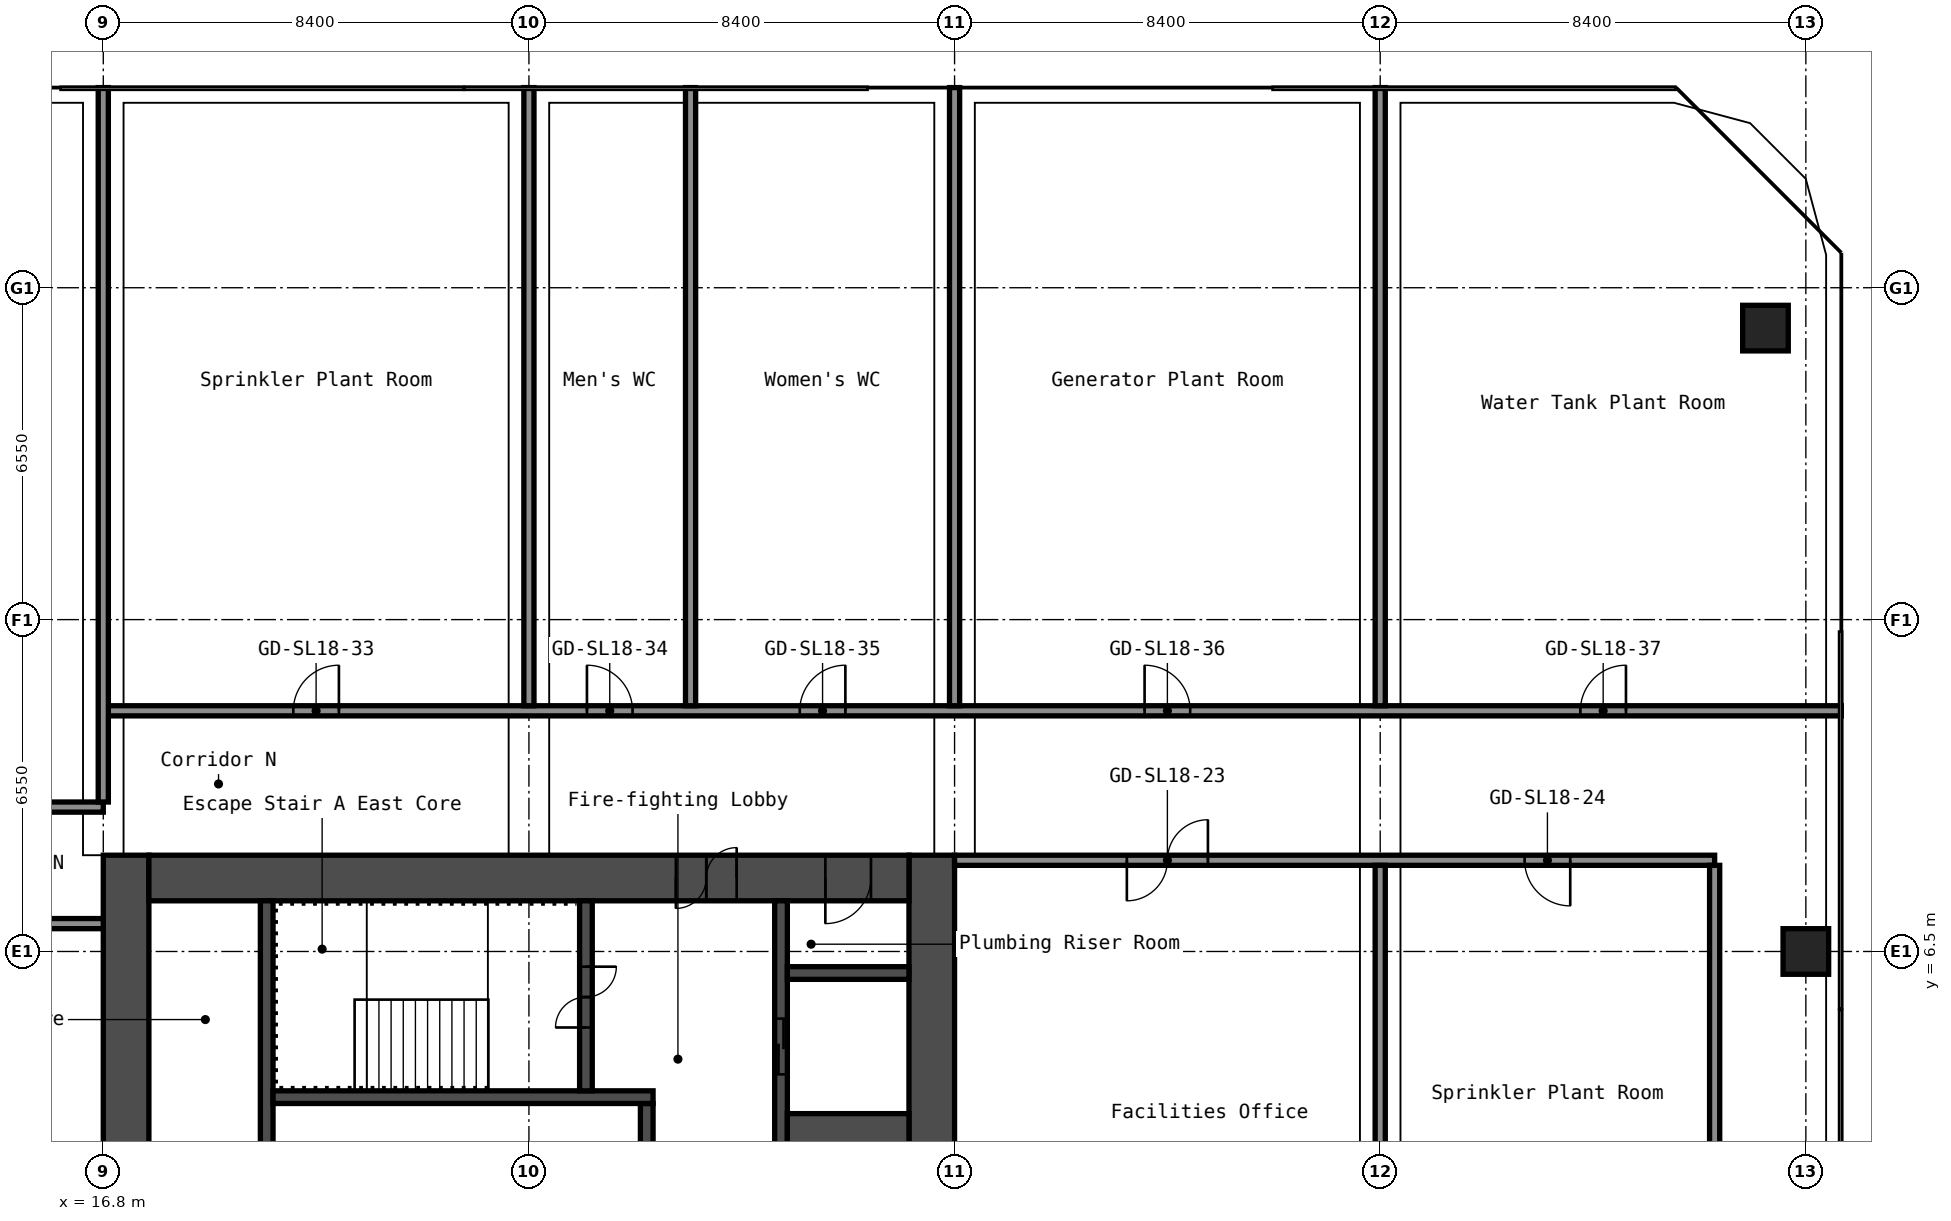
"""IFC4 building model, lengths in metres.
Left out: names, types, materials, properties, quantities, classifications, styles, units other than length and angle.
Written with IfcOpenShell. Run it as: python <this file> out.ifc"""

import sys

from ifc_helpers import new_model, si_unit, direction, frame, frame_2d, origin, origin_2d, place, context, subcontext, project, spatial, rectangle, hollow_rectangle, extrude, element, fill, save


model = new_model("IFC4")
c1 = context("Model", 3, precision=1e-05, world=origin(), true_north=direction((0.0, 1.0)))
c2 = subcontext(c1, "Body", "Model", "MODEL_VIEW")
j1 = project(units=[si_unit("LENGTHUNIT", "METRE"), si_unit("PLANEANGLEUNIT", "RADIAN")], contexts=[c1])
p1 = place(None, origin())
s1 = spatial("IfcSite", under=j1, at=p1, CompositionType="ELEMENT")
p2 = place(p1, origin())
s2 = spatial("IfcBuilding", under=s1, at=p2, CompositionType="ELEMENT")
p3 = place(p2, frame((0.0, 0.0, 64.6)))
s3 = spatial("IfcBuildingStorey", under=s2, at=p3, CompositionType="ELEMENT", Elevation=64.6)
for number, where, z_axis, x_axis in (
    (1, (50.4, 6.5, 0.0), (0.0, 0.0, 1.0), (1.0, 0.0, 0.0)),
    (2, (49.603, 18.803, 0.0), (0.0, 0.0, 1.0), (1.0, 0.0, 0.0)),
):
    element("IfcColumn", number, at=place(p3, frame(where, z_axis=z_axis, x_axis=x_axis)), inside=s3, PredefinedType="COLUMN", context=c2, shape_type="SweptSolid", body=[
        extrude(hollow_rectangle(XDim=0.9, YDim=0.9, WallThickness=0.036, at=origin_2d()), origin(), (0.0, 0.0, 1.0), 4.1),
    ])
p4 = place(p3, frame((17.25, -8.4, 0.0), z_axis=(0.0, 0.0, 1.0), x_axis=(0.0, 1.0, 0.0)))
e3 = element("IfcWall", 3, at=p4, inside=s3, PredefinedType="SHEAR", context=c2, shape_type="SweptSolid", body=[
    extrude(rectangle(XDim=16.8, YDim=0.9, at=frame_2d((8.4, 0.0))), origin(), (0.0, 0.0, 1.0), 4.1),
])
p5 = place(p4, frame((7.6, 0.0, 0.0)))
e4 = element("IfcOpeningElement", 4, at=p5, cuts=e3, PredefinedType="OPENING", context=c2, shape_type="SweptSolid", body=[
    extrude(rectangle(XDim=1.2, YDim=2.1, at=frame_2d((0.6, 1.05))), frame((0.0, 0.46, 0.0), z_axis=(0.0, -1.0, 0.0), x_axis=(1.0, 0.0, 0.0)), (0.0, 0.0, 1.0), 0.92),
])
p6 = place(p3, frame((33.15, -8.4, 0.0), z_axis=(0.0, 0.0, 1.0), x_axis=(0.0, 1.0, 0.0)))
e5 = element("IfcWall", 5, at=p6, inside=s3, PredefinedType="SHEAR", context=c2, shape_type="SweptSolid", body=[
    extrude(rectangle(XDim=16.8, YDim=0.9, at=frame_2d((8.4, 0.0))), origin(), (0.0, 0.0, 1.0), 4.1),
])
p7 = place(p3, frame((17.7, 7.95, 0.0), z_axis=(0.0, 0.0, 1.0), x_axis=(1.0, 0.0, 0.0)))
e6 = element("IfcWall", 6, at=p7, inside=s3, PredefinedType="SHEAR", context=c2, shape_type="SweptSolid", body=[
    extrude(rectangle(XDim=15.0, YDim=0.9, at=frame_2d((7.5, 0.0))), origin(), (0.0, 0.0, 1.0), 4.1),
])
p8 = place(p7, frame((10.4, 0.0, 0.0)))
e7 = element("IfcOpeningElement", 7, at=p8, cuts=e6, PredefinedType="OPENING", context=c2, shape_type="SweptSolid", body=[
    extrude(rectangle(XDim=1.2, YDim=2.1, at=frame_2d((0.6, 1.05))), frame((0.0, 0.46, 0.0), z_axis=(0.0, -1.0, 0.0), x_axis=(1.0, 0.0, 0.0)), (0.0, 0.0, 1.0), 0.92),
])
p9 = place(p7, frame((13.35, 0.0, 0.0)))
e8 = element("IfcOpeningElement", 8, at=p9, cuts=e6, PredefinedType="OPENING", context=c2, shape_type="SweptSolid", body=[
    extrude(rectangle(XDim=0.9, YDim=2.1, at=frame_2d((0.45, 1.05))), frame((0.0, 0.46, 0.0), z_axis=(0.0, -1.0, 0.0), x_axis=(1.0, 0.0, 0.0)), (0.0, 0.0, 1.0), 0.92),
])
p10 = place(p3, frame((20.025, 1.2, 0.0), z_axis=(0.0, 0.0, 1.0), x_axis=(0.0, 1.0, 0.0)))
e9 = element("IfcWall", 9, at=p10, inside=s3, PredefinedType="SHEAR", context=c2, shape_type="SweptSolid", body=[
    extrude(rectangle(XDim=6.3, YDim=0.25, at=frame_2d((3.15, 0.0))), origin(), (0.0, 0.0, 1.0), 4.1),
])
p11 = place(p3, frame((27.525, 1.45, 0.0), z_axis=(0.0, 0.0, 1.0), x_axis=(0.0, 1.0, 0.0)))
e10 = element("IfcWall", 10, at=p11, inside=s3, PredefinedType="SHEAR", context=c2, shape_type="SweptSolid", body=[
    extrude(rectangle(XDim=2.05, YDim=0.25, at=frame_2d((1.025, 0.0))), origin(), (0.0, 0.0, 1.0), 4.1),
])
p12 = place(p3, frame((20.15, 3.625, 0.0), z_axis=(0.0, 0.0, 1.0), x_axis=(1.0, 0.0, 0.0)))
e11 = element("IfcWall", 11, at=p12, inside=s3, PredefinedType="SHEAR", context=c2, shape_type="SweptSolid", body=[
    extrude(rectangle(XDim=7.5, YDim=0.25, at=frame_2d((3.75, 0.0))), origin(), (0.0, 0.0, 1.0), 4.1),
])
p13 = place(p3, frame((26.325, 3.75, 0.0), z_axis=(0.0, 0.0, 1.0), x_axis=(0.0, 1.0, 0.0)))
e12 = element("IfcWall", 12, at=p13, inside=s3, PredefinedType="SHEAR", context=c2, shape_type="SweptSolid", body=[
    extrude(rectangle(XDim=3.75, YDim=0.25, at=frame_2d((1.875, 0.0))), origin(), (0.0, 0.0, 1.0), 4.1),
])
p14 = place(p13, frame((1.25, 0.0, 0.0)))
e13 = element("IfcOpeningElement", 13, at=p14, cuts=e12, PredefinedType="OPENING", context=c2, shape_type="SweptSolid", body=[
    extrude(rectangle(XDim=1.2, YDim=2.1, at=frame_2d((0.6, 1.05))), frame((0.0, 0.135, 0.0), z_axis=(0.0, -1.0, 0.0), x_axis=(1.0, 0.0, 0.0)), (0.0, 0.0, 1.0), 0.27),
])
p15 = place(p3, frame((30.175, 1.45, 0.0), z_axis=(0.0, 0.0, 1.0), x_axis=(0.0, 1.0, 0.0)))
e14 = element("IfcWall", 14, at=p15, inside=s3, PredefinedType="SHEAR", context=c2, shape_type="SweptSolid", body=[
    extrude(rectangle(XDim=6.05, YDim=0.25, at=frame_2d((3.025, 0.0))), origin(), (0.0, 0.0, 1.0), 4.1),
])
p16 = place(p15, frame((2.625, 0.0, 0.0)))
e15 = element("IfcOpeningElement", 15, at=p16, cuts=e14, PredefinedType="OPENING", context=c2, shape_type="SweptSolid", body=[
    extrude(rectangle(XDim=1.1, YDim=2.1, at=frame_2d((0.55, 1.05))), frame((0.0, 0.135, 0.0), z_axis=(0.0, -1.0, 0.0), x_axis=(1.0, 0.0, 0.0)), (0.0, 0.0, 1.0), 0.27),
])
p17 = place(p3, frame((30.3, 2.375, 0.0), z_axis=(0.0, 0.0, 1.0), x_axis=(1.0, 0.0, 0.0)))
e16 = element("IfcWall", 16, at=p17, inside=s3, PredefinedType="SHEAR", context=c2, shape_type="SweptSolid", body=[
    extrude(rectangle(XDim=2.4, YDim=1.85, at=frame_2d((1.2, 0.0))), origin(), (0.0, 0.0, 1.0), 4.1),
])
p18 = place(p3, frame((30.3, 6.075, 0.0), z_axis=(0.0, 0.0, 1.0), x_axis=(1.0, 0.0, 0.0)))
e17 = element("IfcWall", 17, at=p18, inside=s3, PredefinedType="SHEAR", context=c2, shape_type="SweptSolid", body=[
    extrude(rectangle(XDim=2.4, YDim=0.25, at=frame_2d((1.2, 0.0))), origin(), (0.0, 0.0, 1.0), 4.1),
])
p19 = place(p3, frame((-16.8, 7.05, 0.0), z_axis=(0.0, 0.0, 1.0), x_axis=(1.0, 0.0, 0.0)))
e18 = element("IfcWall", 18, at=p19, inside=s3, PredefinedType="PARTITIONING", context=c2, shape_type="SweptSolid", body=[
    extrude(rectangle(XDim=33.6, YDim=0.2, at=frame_2d((16.8, 0.0))), origin(), (0.0, 0.0, 1.0), 4.1),
])
p20 = place(p19, frame((3.4, 0.0, 0.0)))
e19 = element("IfcOpeningElement", 19, at=p20, cuts=e18, PredefinedType="OPENING", context=c2, shape_type="SweptSolid", body=[
    extrude(rectangle(XDim=1.6, YDim=2.1, at=frame_2d((0.8, 1.05))), frame((0.0, 0.11, 0.0), z_axis=(0.0, -1.0, 0.0), x_axis=(1.0, 0.0, 0.0)), (0.0, 0.0, 1.0), 0.22),
])
p21 = place(p19, frame((20.55, 0.0, 0.0)))
e20 = element("IfcOpeningElement", 20, at=p21, cuts=e18, PredefinedType="OPENING", context=c2, shape_type="SweptSolid", body=[
    extrude(rectangle(XDim=0.9, YDim=2.1, at=frame_2d((0.45, 1.05))), frame((0.0, 0.11, 0.0), z_axis=(0.0, -1.0, 0.0), x_axis=(1.0, 0.0, 0.0)), (0.0, 0.0, 1.0), 0.22),
])
p22 = place(p3, frame((33.6, 8.3, 0.0), z_axis=(0.0, 0.0, 1.0), x_axis=(1.0, 0.0, 0.0)))
e21 = element("IfcWall", 21, at=p22, inside=s3, PredefinedType="PARTITIONING", context=c2, shape_type="SweptSolid", body=[
    extrude(rectangle(XDim=15.0, YDim=0.2, at=frame_2d((7.5, 0.0))), origin(), (0.0, 0.0, 1.0), 4.1),
])
p23 = place(p22, frame((3.4, 0.0, 0.0)))
e22 = element("IfcOpeningElement", 22, at=p23, cuts=e21, PredefinedType="OPENING", context=c2, shape_type="SweptSolid", body=[
    extrude(rectangle(XDim=1.6, YDim=2.1, at=frame_2d((0.8, 1.05))), frame((0.0, 0.11, 0.0), z_axis=(0.0, -1.0, 0.0), x_axis=(1.0, 0.0, 0.0)), (0.0, 0.0, 1.0), 0.22),
])
p24 = place(p22, frame((11.25, 0.0, 0.0)))
e23 = element("IfcOpeningElement", 23, at=p24, cuts=e21, PredefinedType="OPENING", context=c2, shape_type="SweptSolid", body=[
    extrude(rectangle(XDim=0.9, YDim=2.1, at=frame_2d((0.45, 1.05))), frame((0.0, 0.11, 0.0), z_axis=(0.0, -1.0, 0.0), x_axis=(1.0, 0.0, 0.0)), (0.0, 0.0, 1.0), 0.22),
])
p25 = place(p3, frame((-16.8, 9.35, 0.0), z_axis=(0.0, 0.0, 1.0), x_axis=(1.0, 0.0, 0.0)))
e24 = element("IfcWall", 24, at=p25, inside=s3, PredefinedType="PARTITIONING", context=c2, shape_type="SweptSolid", body=[
    extrude(rectangle(XDim=33.6, YDim=0.2, at=frame_2d((16.8, 0.0))), origin(), (0.0, 0.0, 1.0), 4.1),
])
p26 = place(p25, frame((3.75, 0.0, 0.0)))
e25 = element("IfcOpeningElement", 25, at=p26, cuts=e24, PredefinedType="OPENING", context=c2, shape_type="SweptSolid", body=[
    extrude(rectangle(XDim=0.9, YDim=2.1, at=frame_2d((0.45, 1.05))), frame((0.0, 0.11, 0.0), z_axis=(0.0, -1.0, 0.0), x_axis=(1.0, 0.0, 0.0)), (0.0, 0.0, 1.0), 0.22),
])
p27 = place(p25, frame((11.8, 0.0, 0.0)))
e26 = element("IfcOpeningElement", 26, at=p27, cuts=e24, PredefinedType="OPENING", context=c2, shape_type="SweptSolid", body=[
    extrude(rectangle(XDim=1.6, YDim=2.1, at=frame_2d((0.8, 1.05))), frame((0.0, 0.11, 0.0), z_axis=(0.0, -1.0, 0.0), x_axis=(1.0, 0.0, 0.0)), (0.0, 0.0, 1.0), 0.22),
])
p28 = place(p25, frame((20.55, 0.0, 0.0)))
e27 = element("IfcOpeningElement", 27, at=p28, cuts=e24, PredefinedType="OPENING", context=c2, shape_type="SweptSolid", body=[
    extrude(rectangle(XDim=0.9, YDim=2.1, at=frame_2d((0.45, 1.05))), frame((0.0, 0.11, 0.0), z_axis=(0.0, -1.0, 0.0), x_axis=(1.0, 0.0, 0.0)), (0.0, 0.0, 1.0), 0.22),
])
p29 = place(p25, frame((28.6, 0.0, 0.0)))
e28 = element("IfcOpeningElement", 28, at=p29, cuts=e24, PredefinedType="OPENING", context=c2, shape_type="SweptSolid", body=[
    extrude(rectangle(XDim=1.6, YDim=2.1, at=frame_2d((0.8, 1.05))), frame((0.0, 0.11, 0.0), z_axis=(0.0, -1.0, 0.0), x_axis=(1.0, 0.0, 0.0)), (0.0, 0.0, 1.0), 0.22),
])
p30 = place(p3, frame((16.8, 11.25, 0.0), z_axis=(0.0, 0.0, 1.0), x_axis=(1.0, 0.0, 0.0)))
e29 = element("IfcWall", 29, at=p30, inside=s3, PredefinedType="PARTITIONING", context=c2, shape_type="SweptSolid", body=[
    extrude(rectangle(XDim=34.3, YDim=0.2, at=frame_2d((17.15, 0.0))), origin(), (0.0, 0.0, 1.0), 4.1),
])
p31 = place(p30, frame((3.75, 0.0, 0.0)))
e30 = element("IfcOpeningElement", 30, at=p31, cuts=e29, PredefinedType="OPENING", context=c2, shape_type="SweptSolid", body=[
    extrude(rectangle(XDim=0.9, YDim=2.1, at=frame_2d((0.45, 1.05))), frame((0.0, 0.11, 0.0), z_axis=(0.0, -1.0, 0.0), x_axis=(1.0, 0.0, 0.0)), (0.0, 0.0, 1.0), 0.22),
])
p32 = place(p30, frame((9.545, 0.0, 0.0)))
e31 = element("IfcOpeningElement", 31, at=p32, cuts=e29, PredefinedType="OPENING", context=c2, shape_type="SweptSolid", body=[
    extrude(rectangle(XDim=0.9, YDim=2.1, at=frame_2d((0.45, 1.05))), frame((0.0, 0.11, 0.0), z_axis=(0.0, -1.0, 0.0), x_axis=(1.0, 0.0, 0.0)), (0.0, 0.0, 1.0), 0.22),
])
p33 = place(p30, frame((13.745, 0.0, 0.0)))
e32 = element("IfcOpeningElement", 32, at=p33, cuts=e29, PredefinedType="OPENING", context=c2, shape_type="SweptSolid", body=[
    extrude(rectangle(XDim=0.9, YDim=2.1, at=frame_2d((0.45, 1.05))), frame((0.0, 0.11, 0.0), z_axis=(0.0, -1.0, 0.0), x_axis=(1.0, 0.0, 0.0)), (0.0, 0.0, 1.0), 0.22),
])
p34 = place(p30, frame((20.55, 0.0, 0.0)))
e33 = element("IfcOpeningElement", 33, at=p34, cuts=e29, PredefinedType="OPENING", context=c2, shape_type="SweptSolid", body=[
    extrude(rectangle(XDim=0.9, YDim=2.1, at=frame_2d((0.45, 1.05))), frame((0.0, 0.11, 0.0), z_axis=(0.0, -1.0, 0.0), x_axis=(1.0, 0.0, 0.0)), (0.0, 0.0, 1.0), 0.22),
])
p35 = place(p30, frame((29.15, 0.0, 0.0)))
e34 = element("IfcOpeningElement", 34, at=p35, cuts=e29, PredefinedType="OPENING", context=c2, shape_type="SweptSolid", body=[
    extrude(rectangle(XDim=0.9, YDim=2.1, at=frame_2d((0.45, 1.05))), frame((0.0, 0.11, 0.0), z_axis=(0.0, -1.0, 0.0), x_axis=(1.0, 0.0, 0.0)), (0.0, 0.0, 1.0), 0.22),
])
p36 = place(p3, frame((16.8, 9.45, 0.0), z_axis=(0.0, 0.0, 1.0), x_axis=(0.0, 1.0, 0.0)))
e35 = element("IfcWall", 35, at=p36, inside=s3, PredefinedType="PARTITIONING", context=c2, shape_type="SweptSolid", body=[
    extrude(rectangle(XDim=14.1, YDim=0.2, at=frame_2d((7.05, 0.0))), origin(), (0.0, 0.0, 1.0), 4.1),
])
for number, where, z_axis, x_axis in (
    (36, (25.2, 11.35, 0.0), (0.0, 0.0, 1.0), (0.0, 1.0, 0.0)),
    (37, (28.39, 11.35, 0.0), (0.0, 0.0, 1.0), (0.0, 1.0, 0.0)),
    (38, (33.6, 11.35, 0.0), (0.0, 0.0, 1.0), (0.0, 1.0, 0.0)),
):
    element("IfcWall", number, at=place(p3, frame(where, z_axis=z_axis, x_axis=x_axis)), inside=s3, PredefinedType="PARTITIONING", context=c2, shape_type="SweptSolid", body=[
        extrude(rectangle(XDim=12.2, YDim=0.2, at=frame_2d((6.1, 0.0))), origin(), (0.0, 0.0, 1.0), 4.1),
    ])
p37 = place(p3, frame((42.0, -8.2, 0.0), z_axis=(0.0, 0.0, 1.0), x_axis=(0.0, 1.0, 0.0)))
e39 = element("IfcWall", 39, at=p37, inside=s3, PredefinedType="PARTITIONING", context=c2, shape_type="SweptSolid", body=[
    extrude(rectangle(XDim=16.4, YDim=0.2, at=frame_2d((8.2, 0.0))), origin(), (0.0, 0.0, 1.0), 4.1),
])
p38 = place(p3, frame((42.0, 11.35, 0.0), z_axis=(0.0, 0.0, 1.0), x_axis=(0.0, 1.0, 0.0)))
e40 = element("IfcWall", 40, at=p38, inside=s3, PredefinedType="PARTITIONING", context=c2, shape_type="SweptSolid", body=[
    extrude(rectangle(XDim=12.2, YDim=0.2, at=frame_2d((6.1, 0.0))), origin(), (0.0, 0.0, 1.0), 4.1),
])
p39 = place(p3, frame((48.6, -8.2, 0.0), z_axis=(0.0, 0.0, 1.0), x_axis=(0.0, 1.0, 0.0)))
e41 = element("IfcWall", 41, at=p39, inside=s3, PredefinedType="PARTITIONING", context=c2, shape_type="SweptSolid", body=[
    extrude(rectangle(XDim=16.4, YDim=0.2, at=frame_2d((8.2, 0.0))), origin(), (0.0, 0.0, 1.0), 4.1),
])
p40 = place(p8, origin())
e42 = element("IfcDoor", 42, at=p40, inside=s3, OperationType="DOUBLE_DOOR_SINGLE_SWING", PredefinedType="DOOR", context=c2, shape_type="SweptSolid", body=[
    extrude(rectangle(XDim=1.2, YDim=2.1, at=frame_2d((0.6, 1.05))), frame((0.0, 0.025, 0.0), z_axis=(0.0, -1.0, 0.0), x_axis=(1.0, 0.0, 0.0)), (0.0, 0.0, 1.0), 0.05),
])
fill(e7, e42)
p41 = place(p9, origin())
e43 = element("IfcDoor", 43, at=p41, inside=s3, OperationType="SINGLE_SWING_LEFT", PredefinedType="DOOR", context=c2, shape_type="SweptSolid", body=[
    extrude(rectangle(XDim=0.9, YDim=2.1, at=frame_2d((0.45, 1.05))), frame((0.0, 0.025, 0.0), z_axis=(0.0, -1.0, 0.0), x_axis=(1.0, 0.0, 0.0)), (0.0, 0.0, 1.0), 0.05),
])
fill(e8, e43)
p42 = place(p14, origin())
e44 = element("IfcDoor", 44, at=p42, inside=s3, OperationType="DOUBLE_DOOR_SINGLE_SWING", PredefinedType="DOOR", context=c2, shape_type="SweptSolid", body=[
    extrude(rectangle(XDim=1.2, YDim=2.1, at=frame_2d((0.6, 1.05))), frame((0.0, 0.025, 0.0), z_axis=(0.0, -1.0, 0.0), x_axis=(1.0, 0.0, 0.0)), (0.0, 0.0, 1.0), 0.05),
])
fill(e13, e44)
p43 = place(p16, origin())
e45 = element("IfcDoor", 45, at=p43, inside=s3, OperationType="DOUBLE_DOOR_SLIDING", PredefinedType="DOOR", context=c2, shape_type="SweptSolid", body=[
    extrude(rectangle(XDim=1.1, YDim=2.1, at=frame_2d((0.55, 1.05))), frame((0.0, 0.025, 0.0), z_axis=(0.0, -1.0, 0.0), x_axis=(1.0, 0.0, 0.0)), (0.0, 0.0, 1.0), 0.05),
])
fill(e15, e45)
p44 = place(p23, origin())
e46 = element("IfcDoor", 46, at=p44, inside=s3, OperationType="DOUBLE_DOOR_SINGLE_SWING", PredefinedType="DOOR", context=c2, shape_type="SweptSolid", body=[
    extrude(rectangle(XDim=1.6, YDim=2.1, at=frame_2d((0.8, 1.05))), frame((0.0, 0.025, 0.0), z_axis=(0.0, -1.0, 0.0), x_axis=(1.0, 0.0, 0.0)), (0.0, 0.0, 1.0), 0.05),
])
fill(e22, e46)
p45 = place(p24, origin())
e47 = element("IfcDoor", 47, at=p45, inside=s3, OperationType="SINGLE_SWING_RIGHT", PredefinedType="DOOR", context=c2, shape_type="SweptSolid", body=[
    extrude(rectangle(XDim=0.9, YDim=2.1, at=frame_2d((0.45, 1.05))), frame((0.0, 0.025, 0.0), z_axis=(0.0, -1.0, 0.0), x_axis=(1.0, 0.0, 0.0)), (0.0, 0.0, 1.0), 0.05),
])
fill(e23, e47)
p46 = place(p31, origin())
e48 = element("IfcDoor", 48, at=p46, inside=s3, OperationType="SINGLE_SWING_LEFT", PredefinedType="DOOR", context=c2, shape_type="SweptSolid", body=[
    extrude(rectangle(XDim=0.9, YDim=2.1, at=frame_2d((0.45, 1.05))), frame((0.0, 0.025, 0.0), z_axis=(0.0, -1.0, 0.0), x_axis=(1.0, 0.0, 0.0)), (0.0, 0.0, 1.0), 0.05),
])
fill(e30, e48)
p47 = place(p32, origin())
e49 = element("IfcDoor", 49, at=p47, inside=s3, OperationType="SINGLE_SWING_RIGHT", PredefinedType="DOOR", context=c2, shape_type="SweptSolid", body=[
    extrude(rectangle(XDim=0.9, YDim=2.1, at=frame_2d((0.45, 1.05))), frame((0.0, 0.025, 0.0), z_axis=(0.0, -1.0, 0.0), x_axis=(1.0, 0.0, 0.0)), (0.0, 0.0, 1.0), 0.05),
])
fill(e31, e49)
p48 = place(p33, origin())
e50 = element("IfcDoor", 50, at=p48, inside=s3, OperationType="SINGLE_SWING_LEFT", PredefinedType="DOOR", context=c2, shape_type="SweptSolid", body=[
    extrude(rectangle(XDim=0.9, YDim=2.1, at=frame_2d((0.45, 1.05))), frame((0.0, 0.025, 0.0), z_axis=(0.0, -1.0, 0.0), x_axis=(1.0, 0.0, 0.0)), (0.0, 0.0, 1.0), 0.05),
])
fill(e32, e50)
p49 = place(p34, origin())
e51 = element("IfcDoor", 51, at=p49, inside=s3, OperationType="SINGLE_SWING_RIGHT", PredefinedType="DOOR", context=c2, shape_type="SweptSolid", body=[
    extrude(rectangle(XDim=0.9, YDim=2.1, at=frame_2d((0.45, 1.05))), frame((0.0, 0.025, 0.0), z_axis=(0.0, -1.0, 0.0), x_axis=(1.0, 0.0, 0.0)), (0.0, 0.0, 1.0), 0.05),
])
fill(e33, e51)
p50 = place(p35, origin())
e52 = element("IfcDoor", 52, at=p50, inside=s3, OperationType="SINGLE_SWING_LEFT", PredefinedType="DOOR", context=c2, shape_type="SweptSolid", body=[
    extrude(rectangle(XDim=0.9, YDim=2.1, at=frame_2d((0.45, 1.05))), frame((0.0, 0.025, 0.0), z_axis=(0.0, -1.0, 0.0), x_axis=(1.0, 0.0, 0.0)), (0.0, 0.0, 1.0), 0.05),
])
fill(e34, e52)
save(model, sys.argv[1])
